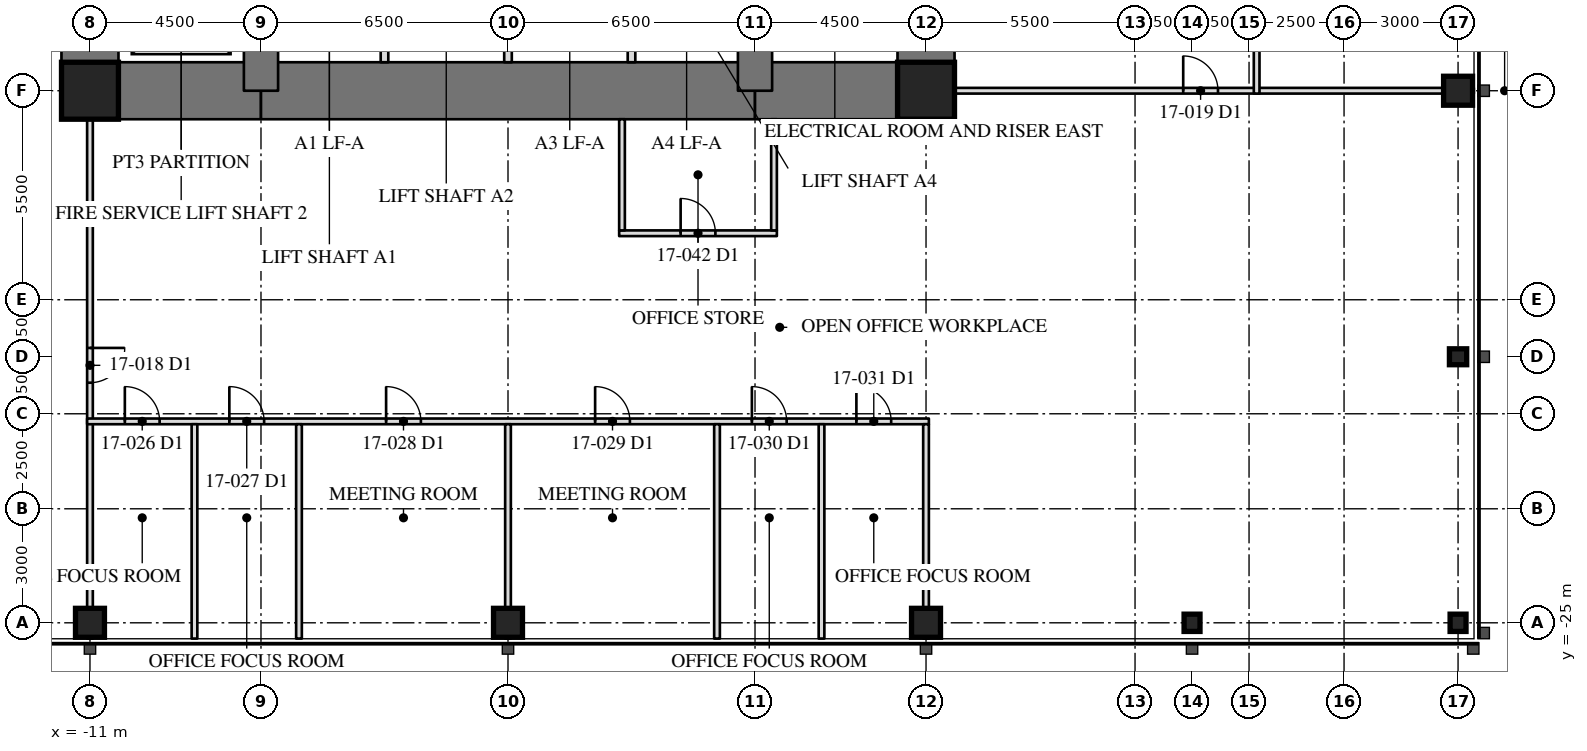
"""IFC4 building model, lengths in metres.
Left out: names, types, materials, properties, quantities, classifications, styles, units other than length and angle.
Written with IfcOpenShell. Run it as: python <this file> out.ifc"""

import sys

from ifc_helpers import new_model, si_unit, direction, frame, frame_2d, origin, origin_2d, place, context, subcontext, project, spatial, rectangle, hollow_rectangle, i_section, extrude, element, fill, save


model = new_model("IFC4")
c1 = context("Model", 3, precision=1e-05, world=origin(), true_north=direction((0.0, 1.0)))
c2 = subcontext(c1, "Body", "Model", "MODEL_VIEW")
j1 = project(units=[si_unit("LENGTHUNIT", "METRE"), si_unit("PLANEANGLEUNIT", "RADIAN")], contexts=[c1])
p1 = place(None, origin())
s1 = spatial("IfcSite", under=j1, at=p1, CompositionType="ELEMENT")
p2 = place(p1, origin())
s2 = spatial("IfcBuilding", under=s1, at=p2, CompositionType="ELEMENT")
p3 = place(p2, frame((0.0, 0.0, 73.4)))
s3 = spatial("IfcBuildingStorey", under=s2, at=p3, CompositionType="ELEMENT", Elevation=73.4)
for number, where, z_axis, x_axis in (
    (1, (-11.0, -25.0, 0.0), (0.0, 0.0, 1.0), (1.0, 0.0, 0.0)),
    (2, (0.0, -25.0, 0.0), (0.0, 0.0, 1.0), (1.0, 0.0, 0.0)),
    (3, (11.0, -25.0, 0.0), (0.0, 0.0, 1.0), (1.0, 0.0, 0.0)),
):
    element("IfcColumn", number, at=place(p3, frame(where, z_axis=z_axis, x_axis=x_axis)), inside=s3, PredefinedType="COLUMN", context=c2, shape_type="SweptSolid", body=[
        extrude(hollow_rectangle(XDim=0.762, YDim=0.762, WallThickness=0.127, at=origin_2d()), origin(), (0.0, 0.0, 1.0), 4.1),
    ])
for number, where, z_axis, x_axis in (
    (4, (18.0, -25.0, 0.0), (0.0, 0.0, 1.0), (1.0, 0.0, 0.0)),
    (5, (25.0, -25.0, 0.0), (0.0, 0.0, 1.0), (1.0, 0.0, 0.0)),
    (6, (25.0, -18.0, 0.0), (0.0, 0.0, 1.0), (0.0, 1.0, 0.0)),
):
    element("IfcColumn", number, at=place(p3, frame(where, z_axis=z_axis, x_axis=x_axis)), inside=s3, PredefinedType="COLUMN", context=c2, shape_type="SweptSolid", body=[
        extrude(i_section(OverallWidth=0.419, OverallDepth=0.455, WebThickness=0.042, FlangeThickness=0.068, at=origin_2d()), origin(), (0.0, 0.0, 1.0), 4.1),
    ])
p4 = place(p3, frame((25.0, -11.0, 0.0), z_axis=(0.0, 0.0, 1.0), x_axis=(0.0, 1.0, 0.0)))
e7 = element("IfcColumn", 7, at=p4, inside=s3, PredefinedType="COLUMN", context=c2, shape_type="SweptSolid", body=[
    extrude(hollow_rectangle(XDim=0.762, YDim=0.762, WallThickness=0.127, at=origin_2d()), origin(), (0.0, 0.0, 1.0), 4.1),
])
p5 = place(p3, frame((11.0, -11.0, 0.0), z_axis=(0.0, 0.0, 1.0), x_axis=(0.0, 1.0, 0.0)))
e8 = element("IfcWall", 8, at=p5, inside=s3, PredefinedType="SHEAR", context=c2, shape_type="SweptSolid", body=[
    extrude(rectangle(XDim=22.0, YDim=1.5, at=frame_2d((11.0, 0.0))), origin(), (0.0, 0.0, 1.0), 4.1),
])
p6 = place(p5, frame((15.393, 0.0, 0.0)))
e9 = element("IfcOpeningElement", 9, at=p6, cuts=e8, PredefinedType="OPENING", context=c2, shape_type="SweptSolid", body=[
    extrude(rectangle(XDim=0.915, YDim=2.134, at=frame_2d((0.458, 1.067))), frame((0.0, 0.76, 0.0), z_axis=(0.0, -1.0, 0.0), x_axis=(1.0, 0.0, 0.0)), (0.0, 0.0, 1.0), 1.52),
])
p7 = place(p3, frame((-11.0, 11.0, 0.0), z_axis=(0.0, 0.0, 1.0), x_axis=(0.0, -1.0, 0.0)))
e10 = element("IfcWall", 10, at=p7, inside=s3, PredefinedType="SHEAR", context=c2, shape_type="SweptSolid", body=[
    extrude(rectangle(XDim=22.0, YDim=1.5, at=frame_2d((11.0, 0.0))), origin(), (0.0, 0.0, 1.0), 4.1),
])
p8 = place(p7, frame((15.393, 0.0, 0.0)))
e11 = element("IfcOpeningElement", 11, at=p8, cuts=e10, PredefinedType="OPENING", context=c2, shape_type="SweptSolid", body=[
    extrude(rectangle(XDim=0.915, YDim=2.134, at=frame_2d((0.458, 1.067))), frame((0.0, 0.76, 0.0), z_axis=(0.0, -1.0, 0.0), x_axis=(1.0, 0.0, 0.0)), (0.0, 0.0, 1.0), 1.52),
])
p9 = place(p3, frame((-11.0, -11.0, 0.0), z_axis=(0.0, 0.0, 1.0), x_axis=(1.0, 0.0, 0.0)))
e12 = element("IfcWall", 12, at=p9, inside=s3, PredefinedType="SHEAR", context=c2, shape_type="SweptSolid", body=[
    extrude(rectangle(XDim=4.5, YDim=1.5, at=frame_2d((2.25, 0.0))), origin(), (0.0, 0.0, 1.0), 4.1),
])
p10 = place(p3, frame((-6.5, -11.0, 0.0), z_axis=(0.0, 0.0, 1.0), x_axis=(1.0, 0.0, 0.0)))
e13 = element("IfcWall", 13, at=p10, inside=s3, PredefinedType="SHEAR", context=c2, shape_type="SweptSolid", body=[
    extrude(rectangle(XDim=13.0, YDim=1.5, at=frame_2d((6.5, 0.0))), origin(), (0.0, 0.0, 1.0), 4.1),
])
p11 = place(p3, frame((6.5, -11.0, 0.0), z_axis=(0.0, 0.0, 1.0), x_axis=(1.0, 0.0, 0.0)))
e14 = element("IfcWall", 14, at=p11, inside=s3, PredefinedType="SHEAR", context=c2, shape_type="SweptSolid", body=[
    extrude(rectangle(XDim=4.5, YDim=1.5, at=frame_2d((2.25, 0.0))), origin(), (0.0, 0.0, 1.0), 4.1),
])
for number, where, z_axis, x_axis in (
    (15, (6.5, -11.0, 0.0), (0.0, 0.0, 1.0), (0.0, 1.0, 0.0)),
    (16, (-6.5, -6.5, 0.0), (0.0, 0.0, 1.0), (0.0, -1.0, 0.0)),
):
    element("IfcWall", number, at=place(p3, frame(where, z_axis=z_axis, x_axis=x_axis)), inside=s3, PredefinedType="SHEAR", context=c2, shape_type="SweptSolid", body=[
        extrude(rectangle(XDim=4.5, YDim=0.9, at=frame_2d((2.25, 0.0))), origin(), (0.0, 0.0, 1.0), 4.1),
    ])
for number, where, z_axis, x_axis in (
    (17, (-11.0, -11.0, 0.0), (0.0, 0.0, 1.0), (1.0, 0.0, 0.0)),
    (18, (11.0, -11.0, 0.0), (0.0, 0.0, 1.0), (1.0, 0.0, 0.0)),
):
    element("IfcColumn", number, at=place(p3, frame(where, z_axis=z_axis, x_axis=x_axis)), inside=s3, PredefinedType="COLUMN", context=c2, shape_type="SweptSolid", body=[
        extrude(hollow_rectangle(XDim=1.499, YDim=1.499, WallThickness=0.102, at=origin_2d()), origin(), (0.0, 0.0, 1.0), 4.1),
    ])
for number, where, z_axis, x_axis in (
    (19, (-3.25, -10.25, 0.0), (0.0, 0.0, 1.0), (0.0, 1.0, 0.0)),
    (20, (0.0, -10.25, 0.0), (0.0, 0.0, 1.0), (0.0, 1.0, 0.0)),
    (21, (3.25, -10.25, 0.0), (0.0, 0.0, 1.0), (0.0, 1.0, 0.0)),
):
    element("IfcWall", number, at=place(p3, frame(where, z_axis=z_axis, x_axis=x_axis)), inside=s3, PredefinedType="PARTITIONING", context=c2, shape_type="SweptSolid", body=[
        extrude(rectangle(XDim=3.3, YDim=0.2, at=frame_2d((1.65, 0.0))), origin(), (0.0, 0.0, 1.0), 3.91),
    ])
p12 = place(p3, frame((-11.0, -11.75, 0.0), z_axis=(0.0, 0.0, 1.0), x_axis=(0.0, -1.0, 0.0)))
e22 = element("IfcWall", 22, at=p12, inside=s3, PredefinedType="PARTITIONING", context=c2, shape_type="SweptSolid", body=[
    extrude(rectangle(XDim=13.665, YDim=0.15, at=frame_2d((6.833, 0.0))), origin(), (0.0, 0.0, 1.0), 3.13),
])
p13 = place(p12, frame((6.018, 0.0, 0.0)))
e23 = element("IfcOpeningElement", 23, at=p13, cuts=e22, PredefinedType="OPENING", context=c2, shape_type="SweptSolid", body=[
    extrude(rectangle(XDim=0.915, YDim=2.134, at=frame_2d((0.458, 1.067))), frame((0.0, 0.085, 0.0), z_axis=(0.0, -1.0, 0.0), x_axis=(1.0, 0.0, 0.0)), (0.0, 0.0, 1.0), 0.17),
])
p14 = place(p3, frame((11.75, -11.0, 0.0), z_axis=(0.0, 0.0, 1.0), x_axis=(1.0, 0.0, 0.0)))
e24 = element("IfcWall", 24, at=p14, inside=s3, PredefinedType="PARTITIONING", context=c2, shape_type="SweptSolid", body=[
    extrude(rectangle(XDim=13.665, YDim=0.15, at=frame_2d((6.833, 0.0))), origin(), (0.0, 0.0, 1.0), 3.13),
])
p15 = place(p14, frame((6.018, 0.0, 0.0)))
e25 = element("IfcOpeningElement", 25, at=p15, cuts=e24, PredefinedType="OPENING", context=c2, shape_type="SweptSolid", body=[
    extrude(rectangle(XDim=0.915, YDim=2.134, at=frame_2d((0.458, 1.067))), frame((0.0, 0.085, 0.0), z_axis=(0.0, -1.0, 0.0), x_axis=(1.0, 0.0, 0.0)), (0.0, 0.0, 1.0), 0.17),
])
p16 = place(p3, frame((-11.075, -19.7, 0.0), z_axis=(0.0, 0.0, 1.0), x_axis=(1.0, 0.0, 0.0)))
e26 = element("IfcWall", 26, at=p16, inside=s3, PredefinedType="PARTITIONING", context=c2, shape_type="SweptSolid", body=[
    extrude(rectangle(XDim=22.15, YDim=0.15, at=frame_2d((11.075, 0.0))), origin(), (0.0, 0.0, 1.0), 3.91),
])
p17 = place(p16, frame((0.992, 0.0, 0.0)))
e27 = element("IfcOpeningElement", 27, at=p17, cuts=e26, PredefinedType="OPENING", context=c2, shape_type="SweptSolid", body=[
    extrude(rectangle(XDim=0.915, YDim=2.134, at=frame_2d((0.458, 1.067))), frame((0.0, 0.085, 0.0), z_axis=(0.0, -1.0, 0.0), x_axis=(1.0, 0.0, 0.0)), (0.0, 0.0, 1.0), 0.17),
])
p18 = place(p16, frame((3.742, 0.0, 0.0)))
e28 = element("IfcOpeningElement", 28, at=p18, cuts=e26, PredefinedType="OPENING", context=c2, shape_type="SweptSolid", body=[
    extrude(rectangle(XDim=0.915, YDim=2.134, at=frame_2d((0.458, 1.067))), frame((0.0, 0.085, 0.0), z_axis=(0.0, -1.0, 0.0), x_axis=(1.0, 0.0, 0.0)), (0.0, 0.0, 1.0), 0.17),
])
p19 = place(p16, frame((7.867, 0.0, 0.0)))
e29 = element("IfcOpeningElement", 29, at=p19, cuts=e26, PredefinedType="OPENING", context=c2, shape_type="SweptSolid", body=[
    extrude(rectangle(XDim=0.915, YDim=2.134, at=frame_2d((0.458, 1.067))), frame((0.0, 0.085, 0.0), z_axis=(0.0, -1.0, 0.0), x_axis=(1.0, 0.0, 0.0)), (0.0, 0.0, 1.0), 0.17),
])
p20 = place(p16, frame((13.367, 0.0, 0.0)))
e30 = element("IfcOpeningElement", 30, at=p20, cuts=e26, PredefinedType="OPENING", context=c2, shape_type="SweptSolid", body=[
    extrude(rectangle(XDim=0.915, YDim=2.134, at=frame_2d((0.458, 1.067))), frame((0.0, 0.085, 0.0), z_axis=(0.0, -1.0, 0.0), x_axis=(1.0, 0.0, 0.0)), (0.0, 0.0, 1.0), 0.17),
])
p21 = place(p16, frame((17.492, 0.0, 0.0)))
e31 = element("IfcOpeningElement", 31, at=p21, cuts=e26, PredefinedType="OPENING", context=c2, shape_type="SweptSolid", body=[
    extrude(rectangle(XDim=0.915, YDim=2.134, at=frame_2d((0.458, 1.067))), frame((0.0, 0.085, 0.0), z_axis=(0.0, -1.0, 0.0), x_axis=(1.0, 0.0, 0.0)), (0.0, 0.0, 1.0), 0.17),
])
p22 = place(p16, frame((20.242, 0.0, 0.0)))
e32 = element("IfcOpeningElement", 32, at=p22, cuts=e26, PredefinedType="OPENING", context=c2, shape_type="SweptSolid", body=[
    extrude(rectangle(XDim=0.915, YDim=2.134, at=frame_2d((0.458, 1.067))), frame((0.0, 0.085, 0.0), z_axis=(0.0, -1.0, 0.0), x_axis=(1.0, 0.0, 0.0)), (0.0, 0.0, 1.0), 0.17),
])
for number, where, z_axis, x_axis in (
    (33, (-8.25, -19.775, 0.0), (0.0, 0.0, 1.0), (0.0, -1.0, 0.0)),
    (34, (-5.5, -19.775, 0.0), (0.0, 0.0, 1.0), (0.0, -1.0, 0.0)),
):
    element("IfcWall", number, at=place(p3, frame(where, z_axis=z_axis, x_axis=x_axis)), inside=s3, PredefinedType="PARTITIONING", context=c2, shape_type="SweptSolid", body=[
        extrude(rectangle(XDim=5.64, YDim=0.15, at=frame_2d((2.82, 0.0))), origin(), (0.0, 0.0, 1.0), 3.91),
    ])
p23 = place(p3, frame((0.0, -19.775, 0.0), z_axis=(0.0, 0.0, 1.0), x_axis=(0.0, -1.0, 0.0)))
e35 = element("IfcWall", 35, at=p23, inside=s3, PredefinedType="PARTITIONING", context=c2, shape_type="SweptSolid", body=[
    extrude(rectangle(XDim=5.64, YDim=0.15, at=frame_2d((2.82, 0.0))), origin(), (0.0, 0.0, 1.0), 3.13),
])
for number, where, z_axis, x_axis in (
    (36, (5.5, -19.775, 0.0), (0.0, 0.0, 1.0), (0.0, -1.0, 0.0)),
    (37, (8.25, -19.775, 0.0), (0.0, 0.0, 1.0), (0.0, -1.0, 0.0)),
):
    element("IfcWall", number, at=place(p3, frame(where, z_axis=z_axis, x_axis=x_axis)), inside=s3, PredefinedType="PARTITIONING", context=c2, shape_type="SweptSolid", body=[
        extrude(rectangle(XDim=5.64, YDim=0.15, at=frame_2d((2.82, 0.0))), origin(), (0.0, 0.0, 1.0), 3.91),
    ])
p24 = place(p3, frame((11.0, -19.775, 0.0), z_axis=(0.0, 0.0, 1.0), x_axis=(0.0, -1.0, 0.0)))
e38 = element("IfcWall", 38, at=p24, inside=s3, PredefinedType="PARTITIONING", context=c2, shape_type="SweptSolid", body=[
    extrude(rectangle(XDim=5.64, YDim=0.15, at=frame_2d((2.82, 0.0))), origin(), (0.0, 0.0, 1.0), 3.13),
])
p25 = place(p3, frame((19.7, -11.075, 0.0), z_axis=(0.0, 0.0, 1.0), x_axis=(0.0, 1.0, 0.0)))
e39 = element("IfcWall", 39, at=p25, inside=s3, PredefinedType="PARTITIONING", context=c2, shape_type="SweptSolid", body=[
    extrude(rectangle(XDim=22.15, YDim=0.15, at=frame_2d((11.075, 0.0))), origin(), (0.0, 0.0, 1.0), 3.91),
])
p26 = place(p25, frame((2.367, 0.0, 0.0)))
e40 = element("IfcOpeningElement", 40, at=p26, cuts=e39, PredefinedType="OPENING", context=c2, shape_type="SweptSolid", body=[
    extrude(rectangle(XDim=0.915, YDim=2.134, at=frame_2d((0.458, 1.067))), frame((0.0, 0.085, 0.0), z_axis=(0.0, -1.0, 0.0), x_axis=(1.0, 0.0, 0.0)), (0.0, 0.0, 1.0), 0.17),
])
p27 = place(p25, frame((7.867, 0.0, 0.0)))
e41 = element("IfcOpeningElement", 41, at=p27, cuts=e39, PredefinedType="OPENING", context=c2, shape_type="SweptSolid", body=[
    extrude(rectangle(XDim=0.915, YDim=2.134, at=frame_2d((0.458, 1.067))), frame((0.0, 0.085, 0.0), z_axis=(0.0, -1.0, 0.0), x_axis=(1.0, 0.0, 0.0)), (0.0, 0.0, 1.0), 0.17),
])
p28 = place(p25, frame((13.367, 0.0, 0.0)))
e42 = element("IfcOpeningElement", 42, at=p28, cuts=e39, PredefinedType="OPENING", context=c2, shape_type="SweptSolid", body=[
    extrude(rectangle(XDim=0.915, YDim=2.134, at=frame_2d((0.458, 1.067))), frame((0.0, 0.085, 0.0), z_axis=(0.0, -1.0, 0.0), x_axis=(1.0, 0.0, 0.0)), (0.0, 0.0, 1.0), 0.17),
])
p29 = place(p25, frame((18.867, 0.0, 0.0)))
e43 = element("IfcOpeningElement", 43, at=p29, cuts=e39, PredefinedType="OPENING", context=c2, shape_type="SweptSolid", body=[
    extrude(rectangle(XDim=0.915, YDim=2.134, at=frame_2d((0.458, 1.067))), frame((0.0, 0.085, 0.0), z_axis=(0.0, -1.0, 0.0), x_axis=(1.0, 0.0, 0.0)), (0.0, 0.0, 1.0), 0.17),
])
p30 = place(p3, frame((2.925, -14.75, 0.0), z_axis=(0.0, 0.0, 1.0), x_axis=(1.0, 0.0, 0.0)))
e44 = element("IfcWall", 44, at=p30, inside=s3, PredefinedType="PARTITIONING", context=c2, shape_type="SweptSolid", body=[
    extrude(rectangle(XDim=4.15, YDim=0.15, at=frame_2d((2.075, 0.0))), origin(), (0.0, 0.0, 1.0), 3.91),
])
p31 = place(p30, frame((1.617, 0.0, 0.0)))
e45 = element("IfcOpeningElement", 45, at=p31, cuts=e44, PredefinedType="OPENING", context=c2, shape_type="SweptSolid", body=[
    extrude(rectangle(XDim=0.915, YDim=2.134, at=frame_2d((0.458, 1.067))), frame((0.0, 0.085, 0.0), z_axis=(0.0, -1.0, 0.0), x_axis=(1.0, 0.0, 0.0)), (0.0, 0.0, 1.0), 0.17),
])
for number, where, z_axis, x_axis in (
    (46, (3.0, -14.675, 0.0), (0.0, 0.0, 1.0), (0.0, 1.0, 0.0)),
    (47, (7.0, -14.675, 0.0), (0.0, 0.0, 1.0), (0.0, 1.0, 0.0)),
):
    element("IfcWall", number, at=place(p3, frame(where, z_axis=z_axis, x_axis=x_axis)), inside=s3, PredefinedType="PARTITIONING", context=c2, shape_type="SweptSolid", body=[
        extrude(rectangle(XDim=2.925, YDim=0.15, at=frame_2d((1.462, 0.0))), origin(), (0.0, 0.0, 1.0), 3.91),
    ])
p32 = place(p13, origin())
e48 = element("IfcDoor", 48, at=p32, inside=s3, OperationType="SINGLE_SWING_LEFT", PredefinedType="DOOR", context=c2, shape_type="SweptSolid", body=[
    extrude(rectangle(XDim=0.915, YDim=2.134, at=frame_2d((0.458, 1.067))), frame((0.0, 0.025, 0.0), z_axis=(0.0, -1.0, 0.0), x_axis=(1.0, 0.0, 0.0)), (0.0, 0.0, 1.0), 0.05),
])
fill(e23, e48)
p33 = place(p15, origin())
e49 = element("IfcDoor", 49, at=p33, inside=s3, OperationType="SINGLE_SWING_LEFT", PredefinedType="DOOR", context=c2, shape_type="SweptSolid", body=[
    extrude(rectangle(XDim=0.915, YDim=2.134, at=frame_2d((0.458, 1.067))), frame((0.0, 0.025, 0.0), z_axis=(0.0, -1.0, 0.0), x_axis=(1.0, 0.0, 0.0)), (0.0, 0.0, 1.0), 0.05),
])
fill(e25, e49)
p34 = place(p17, origin())
e50 = element("IfcDoor", 50, at=p34, inside=s3, OperationType="SINGLE_SWING_LEFT", PredefinedType="DOOR", context=c2, shape_type="SweptSolid", body=[
    extrude(rectangle(XDim=0.915, YDim=2.134, at=frame_2d((0.458, 1.067))), frame((0.0, 0.025, 0.0), z_axis=(0.0, -1.0, 0.0), x_axis=(1.0, 0.0, 0.0)), (0.0, 0.0, 1.0), 0.05),
])
fill(e27, e50)
p35 = place(p18, origin())
e51 = element("IfcDoor", 51, at=p35, inside=s3, OperationType="SINGLE_SWING_LEFT", PredefinedType="DOOR", context=c2, shape_type="SweptSolid", body=[
    extrude(rectangle(XDim=0.915, YDim=2.134, at=frame_2d((0.458, 1.067))), frame((0.0, 0.025, 0.0), z_axis=(0.0, -1.0, 0.0), x_axis=(1.0, 0.0, 0.0)), (0.0, 0.0, 1.0), 0.05),
])
fill(e28, e51)
p36 = place(p19, origin())
e52 = element("IfcDoor", 52, at=p36, inside=s3, OperationType="SINGLE_SWING_LEFT", PredefinedType="DOOR", context=c2, shape_type="SweptSolid", body=[
    extrude(rectangle(XDim=0.915, YDim=2.134, at=frame_2d((0.458, 1.067))), frame((0.0, 0.025, 0.0), z_axis=(0.0, -1.0, 0.0), x_axis=(1.0, 0.0, 0.0)), (0.0, 0.0, 1.0), 0.05),
])
fill(e29, e52)
p37 = place(p20, origin())
e53 = element("IfcDoor", 53, at=p37, inside=s3, OperationType="SINGLE_SWING_LEFT", PredefinedType="DOOR", context=c2, shape_type="SweptSolid", body=[
    extrude(rectangle(XDim=0.915, YDim=2.134, at=frame_2d((0.458, 1.067))), frame((0.0, 0.025, 0.0), z_axis=(0.0, -1.0, 0.0), x_axis=(1.0, 0.0, 0.0)), (0.0, 0.0, 1.0), 0.05),
])
fill(e30, e53)
p38 = place(p21, origin())
e54 = element("IfcDoor", 54, at=p38, inside=s3, OperationType="SINGLE_SWING_LEFT", PredefinedType="DOOR", context=c2, shape_type="SweptSolid", body=[
    extrude(rectangle(XDim=0.915, YDim=2.134, at=frame_2d((0.458, 1.067))), frame((0.0, 0.025, 0.0), z_axis=(0.0, -1.0, 0.0), x_axis=(1.0, 0.0, 0.0)), (0.0, 0.0, 1.0), 0.05),
])
fill(e31, e54)
p39 = place(p22, origin())
e55 = element("IfcDoor", 55, at=p39, inside=s3, OperationType="SINGLE_SWING_LEFT", PredefinedType="DOOR", context=c2, shape_type="SweptSolid", body=[
    extrude(rectangle(XDim=0.915, YDim=2.134, at=frame_2d((0.458, 1.067))), frame((0.0, 0.025, 0.0), z_axis=(0.0, -1.0, 0.0), x_axis=(1.0, 0.0, 0.0)), (0.0, 0.0, 1.0), 0.05),
])
fill(e32, e55)
p40 = place(p31, origin())
e56 = element("IfcDoor", 56, at=p40, inside=s3, OperationType="SINGLE_SWING_LEFT", PredefinedType="DOOR", context=c2, shape_type="SweptSolid", body=[
    extrude(rectangle(XDim=0.915, YDim=2.134, at=frame_2d((0.458, 1.067))), frame((0.0, 0.025, 0.0), z_axis=(0.0, -1.0, 0.0), x_axis=(1.0, 0.0, 0.0)), (0.0, 0.0, 1.0), 0.05),
])
fill(e45, e56)
save(model, sys.argv[1])
